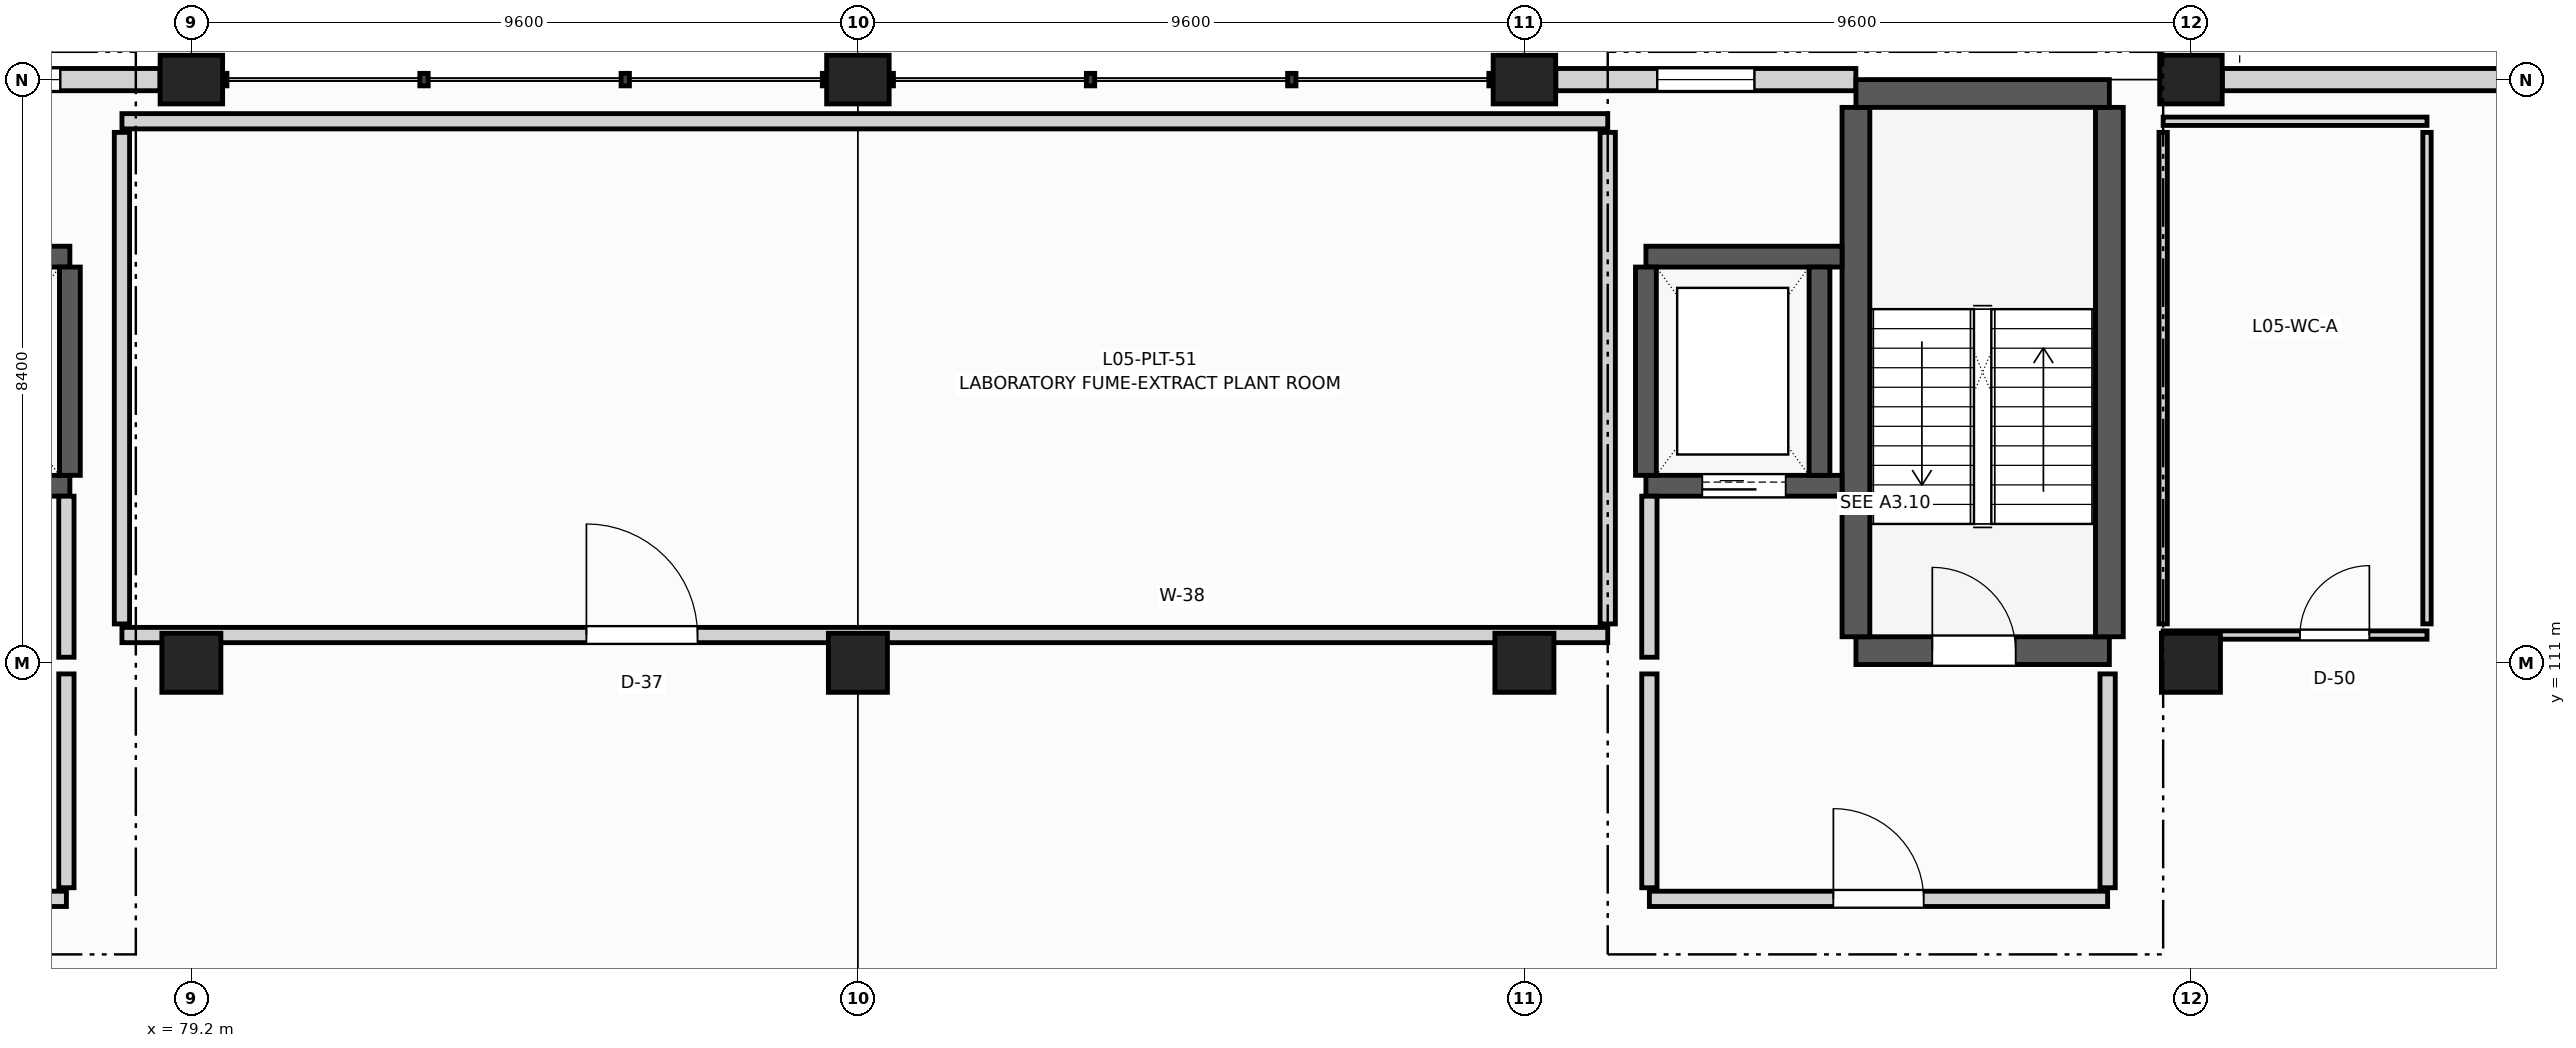
"""IFC4 building model, lengths in metres.
Left out: names, types, materials, properties, quantities, classifications, styles, units other than length and angle.
Written with IfcOpenShell. Run it as: python <this file> out.ifc"""

import sys

from ifc_helpers import new_model, si_unit, direction, frame, frame_2d, origin, origin_2d, place, context, subcontext, project, spatial, rectangle, extrude, element, fill, save


model = new_model("IFC4")
c1 = context("Model", 3, precision=1e-05, world=origin(), true_north=direction((0.0, 1.0)))
c2 = subcontext(c1, "Body", "Model", "MODEL_VIEW")
j1 = project(units=[si_unit("LENGTHUNIT", "METRE"), si_unit("PLANEANGLEUNIT", "RADIAN")], contexts=[c1])
p1 = place(None, origin())
s1 = spatial("IfcSite", under=j1, at=p1, CompositionType="ELEMENT")
p2 = place(p1, origin())
s2 = spatial("IfcBuilding", under=s1, at=p2, CompositionType="ELEMENT")
p3 = place(p2, frame((0.0, 0.0, 22.5)))
s3 = spatial("IfcBuildingStorey", under=s2, at=p3, CompositionType="ELEMENT", Elevation=22.5)
p4 = place(p3, frame((79.2, 111.0, 0.0), z_axis=(0.0, 0.0, 1.0), x_axis=(1.0, 0.0, 0.0)))
e1 = element("IfcColumn", 1, at=p4, inside=s3, PredefinedType="COLUMN", context=c2, shape_type="SweptSolid", body=[
    extrude(rectangle(XDim=0.85, YDim=0.85, at=origin_2d()), origin(), (0.0, 0.0, 1.0), 3.92),
])
p5 = place(p3, frame((79.2, 119.4, 0.0), z_axis=(0.0, 0.0, 1.0), x_axis=(1.0, 0.0, 0.0)))
e2 = element("IfcColumn", 2, at=p5, inside=s3, PredefinedType="COLUMN", context=c2, shape_type="SweptSolid", body=[
    extrude(rectangle(XDim=0.9, YDim=0.7, at=origin_2d()), origin(), (0.0, 0.0, 1.0), 3.92),
])
p6 = place(p3, frame((88.8, 111.0, 0.0), z_axis=(0.0, 0.0, 1.0), x_axis=(1.0, 0.0, 0.0)))
e3 = element("IfcColumn", 3, at=p6, inside=s3, PredefinedType="COLUMN", context=c2, shape_type="SweptSolid", body=[
    extrude(rectangle(XDim=0.85, YDim=0.85, at=origin_2d()), origin(), (0.0, 0.0, 1.0), 3.92),
])
p7 = place(p3, frame((88.8, 119.4, 0.0), z_axis=(0.0, 0.0, 1.0), x_axis=(1.0, 0.0, 0.0)))
e4 = element("IfcColumn", 4, at=p7, inside=s3, PredefinedType="COLUMN", context=c2, shape_type="SweptSolid", body=[
    extrude(rectangle(XDim=0.9, YDim=0.7, at=origin_2d()), origin(), (0.0, 0.0, 1.0), 3.92),
])
p8 = place(p3, frame((98.4, 111.0, 0.0), z_axis=(0.0, 0.0, 1.0), x_axis=(1.0, 0.0, 0.0)))
e5 = element("IfcColumn", 5, at=p8, inside=s3, PredefinedType="COLUMN", context=c2, shape_type="SweptSolid", body=[
    extrude(rectangle(XDim=0.85, YDim=0.85, at=origin_2d()), origin(), (0.0, 0.0, 1.0), 3.92),
])
p9 = place(p3, frame((98.4, 119.4, 0.0), z_axis=(0.0, 0.0, 1.0), x_axis=(1.0, 0.0, 0.0)))
e6 = element("IfcColumn", 6, at=p9, inside=s3, PredefinedType="COLUMN", context=c2, shape_type="SweptSolid", body=[
    extrude(rectangle(XDim=0.9, YDim=0.7, at=origin_2d()), origin(), (0.0, 0.0, 1.0), 3.92),
])
p10 = place(p3, frame((108.0, 111.0, 0.0), z_axis=(0.0, 0.0, 1.0), x_axis=(1.0, 0.0, 0.0)))
e7 = element("IfcColumn", 7, at=p10, inside=s3, PredefinedType="COLUMN", context=c2, shape_type="SweptSolid", body=[
    extrude(rectangle(XDim=0.85, YDim=0.85, at=origin_2d()), origin(), (0.0, 0.0, 1.0), 3.92),
])
p11 = place(p3, frame((108.0, 119.4, 0.0), z_axis=(0.0, 0.0, 1.0), x_axis=(1.0, 0.0, 0.0)))
e8 = element("IfcColumn", 8, at=p11, inside=s3, PredefinedType="COLUMN", context=c2, shape_type="SweptSolid", body=[
    extrude(rectangle(XDim=0.9, YDim=0.7, at=origin_2d()), origin(), (0.0, 0.0, 1.0), 3.92),
])
p12 = place(p3, frame((74.476, 119.4, 0.0), z_axis=(0.0, 0.0, 1.0), x_axis=(1.0, 0.0, 0.0)))
e9 = element("IfcWall", 9, at=p12, inside=s3, PredefinedType="SOLIDWALL", context=c2, shape_type="SweptSolid", body=[
    extrude(rectangle(XDim=4.272, YDim=0.32, at=frame_2d((2.136, 0.0))), origin(), (0.0, 0.0, 1.0), 3.08),
])
p13 = place(p12, frame((1.436, 0.0, 0.9)))
e10 = element("IfcOpeningElement", 10, at=p13, cuts=e9, PredefinedType="OPENING", context=c2, shape_type="SweptSolid", body=[
    extrude(rectangle(XDim=1.4, YDim=1.65, at=frame_2d((0.7, 0.825))), frame((0.0, 0.17, 0.0), z_axis=(0.0, -1.0, 0.0), x_axis=(1.0, 0.0, 0.0)), (0.0, 0.0, 1.0), 0.34),
])
p14 = place(p3, frame((98.852, 119.4, 0.0), z_axis=(0.0, 0.0, 1.0), x_axis=(1.0, 0.0, 0.0)))
e11 = element("IfcWall", 11, at=p14, inside=s3, PredefinedType="SOLIDWALL", context=c2, shape_type="SweptSolid", body=[
    extrude(rectangle(XDim=4.322, YDim=0.32, at=frame_2d((2.161, 0.0))), origin(), (0.0, 0.0, 1.0), 3.08),
])
p15 = place(p14, frame((1.461, 0.0, 0.9)))
e12 = element("IfcOpeningElement", 12, at=p15, cuts=e11, PredefinedType="OPENING", context=c2, shape_type="SweptSolid", body=[
    extrude(rectangle(XDim=1.4, YDim=1.65, at=frame_2d((0.7, 0.825))), frame((0.0, 0.17, 0.0), z_axis=(0.0, -1.0, 0.0), x_axis=(1.0, 0.0, 0.0)), (0.0, 0.0, 1.0), 0.34),
])
p16 = place(p3, frame((108.452, 119.4, 0.0), z_axis=(0.0, 0.0, 1.0), x_axis=(1.0, 0.0, 0.0)))
e13 = element("IfcWall", 13, at=p16, inside=s3, PredefinedType="SOLIDWALL", context=c2, shape_type="SweptSolid", body=[
    extrude(rectangle(XDim=8.696, YDim=0.32, at=frame_2d((4.348, 0.0))), origin(), (0.0, 0.0, 1.0), 3.08),
])
p17 = place(p16, frame((5.448, 0.0, 0.85)))
e14 = element("IfcOpeningElement", 14, at=p17, cuts=e13, PredefinedType="OPENING", context=c2, shape_type="SweptSolid", body=[
    extrude(rectangle(XDim=1.8, YDim=1.9, at=frame_2d((0.9, 0.95))), frame((0.0, 0.17, 0.0), z_axis=(0.0, -1.0, 0.0), x_axis=(1.0, 0.0, 0.0)), (0.0, 0.0, 1.0), 0.34),
])
p18 = place(p3, frame((103.175, 111.175, 0.0), z_axis=(0.0, 0.0, 1.0), x_axis=(1.0, 0.0, 0.0)))
e15 = element("IfcWall", 15, at=p18, inside=s3, PredefinedType="SHEAR", context=c2, shape_type="SweptSolid", body=[
    extrude(rectangle(XDim=3.65, YDim=0.4, at=frame_2d((1.825, 0.0))), origin(), (0.0, 0.0, 1.0), 3.92),
])
p19 = place(p18, frame((1.1, 0.0, 0.0)))
e16 = element("IfcOpeningElement", 16, at=p19, cuts=e15, PredefinedType="OPENING", context=c2, shape_type="SweptSolid", body=[
    extrude(rectangle(XDim=1.2, YDim=2.2, at=frame_2d((0.6, 1.1))), frame((0.0, 0.21, 0.0), z_axis=(0.0, -1.0, 0.0), x_axis=(1.0, 0.0, 0.0)), (0.0, 0.0, 1.0), 0.42),
])
for number, where, z_axis, x_axis in (
    (17, (103.175, 111.375, 0.0), (0.0, 0.0, 1.0), (0.0, 1.0, 0.0)),
    (18, (106.825, 111.375, 0.0), (0.0, 0.0, 1.0), (0.0, 1.0, 0.0)),
):
    element("IfcWall", number, at=place(p3, frame(where, z_axis=z_axis, x_axis=x_axis)), inside=s3, PredefinedType="SHEAR", context=c2, shape_type="SweptSolid", body=[
        extrude(rectangle(XDim=7.625, YDim=0.4, at=frame_2d((3.812, 0.0))), origin(), (0.0, 0.0, 1.0), 3.92),
    ])
p20 = place(p3, frame((103.175, 119.2, 0.0), z_axis=(0.0, 0.0, 1.0), x_axis=(1.0, 0.0, 0.0)))
e19 = element("IfcWall", 19, at=p20, inside=s3, PredefinedType="SHEAR", context=c2, shape_type="SweptSolid", body=[
    extrude(rectangle(XDim=3.65, YDim=0.4, at=frame_2d((1.825, 0.0))), origin(), (0.0, 0.0, 1.0), 3.92),
])
p21 = place(p3, frame((74.7, 113.55, 0.0), z_axis=(0.0, 0.0, 1.0), x_axis=(1.0, 0.0, 0.0)))
e20 = element("IfcWall", 20, at=p21, inside=s3, PredefinedType="SHEAR", context=c2, shape_type="SweptSolid", body=[
    extrude(rectangle(XDim=2.75, YDim=0.3, at=frame_2d((1.375, 0.0))), origin(), (0.0, 0.0, 1.0), 3.92),
])
p22 = place(p21, frame((0.775, 0.0, 0.0)))
e21 = element("IfcOpeningElement", 21, at=p22, cuts=e20, PredefinedType="OPENING", context=c2, shape_type="SweptSolid", body=[
    extrude(rectangle(XDim=1.2, YDim=2.2, at=frame_2d((0.6, 1.1))), frame((0.0, 0.16, 0.0), z_axis=(0.0, -1.0, 0.0), x_axis=(1.0, 0.0, 0.0)), (0.0, 0.0, 1.0), 0.32),
])
p23 = place(p3, frame((74.7, 116.85, 0.0), z_axis=(0.0, 0.0, 1.0), x_axis=(1.0, 0.0, 0.0)))
e22 = element("IfcWall", 22, at=p23, inside=s3, PredefinedType="SHEAR", context=c2, shape_type="SweptSolid", body=[
    extrude(rectangle(XDim=2.75, YDim=0.3, at=frame_2d((1.375, 0.0))), origin(), (0.0, 0.0, 1.0), 3.92),
])
p24 = place(p3, frame((77.45, 113.7, 0.0), z_axis=(0.0, 0.0, 1.0), x_axis=(0.0, 1.0, 0.0)))
e23 = element("IfcWall", 23, at=p24, inside=s3, PredefinedType="SHEAR", context=c2, shape_type="SweptSolid", body=[
    extrude(rectangle(XDim=3.0, YDim=0.3, at=frame_2d((1.5, 0.0))), origin(), (0.0, 0.0, 1.0), 3.92),
])
p25 = place(p3, frame((100.15, 113.55, 0.0), z_axis=(0.0, 0.0, 1.0), x_axis=(1.0, 0.0, 0.0)))
e24 = element("IfcWall", 24, at=p25, inside=s3, PredefinedType="SHEAR", context=c2, shape_type="SweptSolid", body=[
    extrude(rectangle(XDim=2.825, YDim=0.3, at=frame_2d((1.413, 0.0))), origin(), (0.0, 0.0, 1.0), 3.92),
])
p26 = place(p25, frame((0.812, 0.0, 0.0)))
e25 = element("IfcOpeningElement", 25, at=p26, cuts=e24, PredefinedType="OPENING", context=c2, shape_type="SweptSolid", body=[
    extrude(rectangle(XDim=1.2, YDim=2.2, at=frame_2d((0.6, 1.1))), frame((0.0, 0.16, 0.0), z_axis=(0.0, -1.0, 0.0), x_axis=(1.0, 0.0, 0.0)), (0.0, 0.0, 1.0), 0.32),
])
p27 = place(p3, frame((100.15, 116.85, 0.0), z_axis=(0.0, 0.0, 1.0), x_axis=(1.0, 0.0, 0.0)))
e26 = element("IfcWall", 26, at=p27, inside=s3, PredefinedType="SHEAR", context=c2, shape_type="SweptSolid", body=[
    extrude(rectangle(XDim=2.825, YDim=0.3, at=frame_2d((1.413, 0.0))), origin(), (0.0, 0.0, 1.0), 3.92),
])
for number, where, z_axis, x_axis in (
    (27, (100.15, 113.7, 0.0), (0.0, 0.0, 1.0), (0.0, 1.0, 0.0)),
    (28, (102.65, 113.7, 0.0), (0.0, 0.0, 1.0), (0.0, 1.0, 0.0)),
):
    element("IfcWall", number, at=place(p3, frame(where, z_axis=z_axis, x_axis=x_axis)), inside=s3, PredefinedType="SHEAR", context=c2, shape_type="SweptSolid", body=[
        extrude(rectangle(XDim=3.0, YDim=0.3, at=frame_2d((1.5, 0.0))), origin(), (0.0, 0.0, 1.0), 3.92),
    ])
p28 = place(p3, frame((70.8, 107.6, 0.0), z_axis=(0.0, 0.0, 1.0), x_axis=(1.0, 0.0, 0.0)))
e29 = element("IfcWall", 29, at=p28, inside=s3, PredefinedType="PARTITIONING", context=c2, shape_type="SweptSolid", body=[
    extrude(rectangle(XDim=6.6, YDim=0.22, at=frame_2d((3.3, 0.0))), origin(), (0.0, 0.0, 1.0), 3.15),
])
p29 = place(p28, frame((2.65, 0.0, 0.0)))
e30 = element("IfcOpeningElement", 30, at=p29, cuts=e29, PredefinedType="OPENING", context=c2, shape_type="SweptSolid", body=[
    extrude(rectangle(XDim=1.3, YDim=2.2, at=frame_2d((0.65, 1.1))), frame((0.0, 0.12, 0.0), z_axis=(0.0, -1.0, 0.0), x_axis=(1.0, 0.0, 0.0)), (0.0, 0.0, 1.0), 0.24),
])
p30 = place(p3, frame((77.4, 111.08, 0.0), z_axis=(0.0, 0.0, 1.0), x_axis=(0.0, 1.0, 0.0)))
e31 = element("IfcWall", 31, at=p30, inside=s3, PredefinedType="PARTITIONING", context=c2, shape_type="SweptSolid", body=[
    extrude(rectangle(XDim=2.32, YDim=0.22, at=frame_2d((1.16, 0.0))), origin(), (0.0, 0.0, 1.0), 3.15),
])
p31 = place(p3, frame((77.4, 107.76, 0.0), z_axis=(0.0, 0.0, 1.0), x_axis=(0.0, 1.0, 0.0)))
e32 = element("IfcWall", 32, at=p31, inside=s3, PredefinedType="PARTITIONING", context=c2, shape_type="SweptSolid", body=[
    extrude(rectangle(XDim=3.08, YDim=0.22, at=frame_2d((1.54, 0.0))), origin(), (0.0, 0.0, 1.0), 3.15),
])
p32 = place(p3, frame((100.2, 107.6, 0.0), z_axis=(0.0, 0.0, 1.0), x_axis=(1.0, 0.0, 0.0)))
e33 = element("IfcWall", 33, at=p32, inside=s3, PredefinedType="PARTITIONING", context=c2, shape_type="SweptSolid", body=[
    extrude(rectangle(XDim=6.6, YDim=0.22, at=frame_2d((3.3, 0.0))), origin(), (0.0, 0.0, 1.0), 3.15),
])
p33 = place(p32, frame((2.65, 0.0, 0.0)))
e34 = element("IfcOpeningElement", 34, at=p33, cuts=e33, PredefinedType="OPENING", context=c2, shape_type="SweptSolid", body=[
    extrude(rectangle(XDim=1.3, YDim=2.2, at=frame_2d((0.65, 1.1))), frame((0.0, 0.12, 0.0), z_axis=(0.0, -1.0, 0.0), x_axis=(1.0, 0.0, 0.0)), (0.0, 0.0, 1.0), 0.24),
])
p34 = place(p3, frame((100.2, 111.08, 0.0), z_axis=(0.0, 0.0, 1.0), x_axis=(0.0, 1.0, 0.0)))
e35 = element("IfcWall", 35, at=p34, inside=s3, PredefinedType="PARTITIONING", context=c2, shape_type="SweptSolid", body=[
    extrude(rectangle(XDim=2.32, YDim=0.22, at=frame_2d((1.16, 0.0))), origin(), (0.0, 0.0, 1.0), 3.15),
])
for number, where, z_axis, x_axis in (
    (36, (100.2, 107.76, 0.0), (0.0, 0.0, 1.0), (0.0, 1.0, 0.0)),
    (37, (106.8, 107.76, 0.0), (0.0, 0.0, 1.0), (0.0, 1.0, 0.0)),
):
    element("IfcWall", number, at=place(p3, frame(where, z_axis=z_axis, x_axis=x_axis)), inside=s3, PredefinedType="PARTITIONING", context=c2, shape_type="SweptSolid", body=[
        extrude(rectangle(XDim=3.08, YDim=0.22, at=frame_2d((1.54, 0.0))), origin(), (0.0, 0.0, 1.0), 3.15),
    ])
p35 = place(p3, frame((78.2, 111.4, 0.0), z_axis=(0.0, 0.0, 1.0), x_axis=(1.0, 0.0, 0.0)))
e38 = element("IfcWall", 38, at=p35, inside=s3, PredefinedType="PARTITIONING", context=c2, shape_type="SweptSolid", body=[
    extrude(rectangle(XDim=21.4, YDim=0.22, at=frame_2d((10.7, 0.0))), origin(), (0.0, 0.0, 1.0), 3.15),
])
p36 = place(p35, frame((6.69, 0.0, 0.0)))
e39 = element("IfcOpeningElement", 39, at=p36, cuts=e38, PredefinedType="OPENING", context=c2, shape_type="SweptSolid", body=[
    extrude(rectangle(XDim=1.6, YDim=2.3, at=frame_2d((0.8, 1.15))), frame((0.0, 0.12, 0.0), z_axis=(0.0, -1.0, 0.0), x_axis=(1.0, 0.0, 0.0)), (0.0, 0.0, 1.0), 0.24),
])
p37 = place(p3, frame((78.2, 118.8, 0.0), z_axis=(0.0, 0.0, 1.0), x_axis=(1.0, 0.0, 0.0)))
e40 = element("IfcWall", 40, at=p37, inside=s3, PredefinedType="PARTITIONING", context=c2, shape_type="SweptSolid", body=[
    extrude(rectangle(XDim=21.4, YDim=0.22, at=frame_2d((10.7, 0.0))), origin(), (0.0, 0.0, 1.0), 3.15),
])
for number, where, z_axis, x_axis in (
    (41, (78.2, 111.56, 0.0), (0.0, 0.0, 1.0), (0.0, 1.0, 0.0)),
    (42, (99.6, 111.56, 0.0), (0.0, 0.0, 1.0), (0.0, 1.0, 0.0)),
):
    element("IfcWall", number, at=place(p3, frame(where, z_axis=z_axis, x_axis=x_axis)), inside=s3, PredefinedType="PARTITIONING", context=c2, shape_type="SweptSolid", body=[
        extrude(rectangle(XDim=7.08, YDim=0.22, at=frame_2d((3.54, 0.0))), origin(), (0.0, 0.0, 1.0), 3.15),
    ])
p38 = place(p3, frame((107.6, 111.4, 0.0), z_axis=(0.0, 0.0, 1.0), x_axis=(1.0, 0.0, 0.0)))
e43 = element("IfcWall", 43, at=p38, inside=s3, PredefinedType="PARTITIONING", context=c2, shape_type="SweptSolid", body=[
    extrude(rectangle(XDim=3.8, YDim=0.12, at=frame_2d((1.9, 0.0))), origin(), (0.0, 0.0, 1.0), 3.15),
])
p39 = place(p38, frame((1.97, 0.0, 0.0)))
e44 = element("IfcOpeningElement", 44, at=p39, cuts=e43, PredefinedType="OPENING", context=c2, shape_type="SweptSolid", body=[
    extrude(rectangle(XDim=1.0, YDim=2.15, at=frame_2d((0.5, 1.075))), frame((0.0, 0.07, 0.0), z_axis=(0.0, -1.0, 0.0), x_axis=(1.0, 0.0, 0.0)), (0.0, 0.0, 1.0), 0.14),
])
p40 = place(p3, frame((107.6, 118.8, 0.0), z_axis=(0.0, 0.0, 1.0), x_axis=(1.0, 0.0, 0.0)))
e45 = element("IfcWall", 45, at=p40, inside=s3, PredefinedType="PARTITIONING", context=c2, shape_type="SweptSolid", body=[
    extrude(rectangle(XDim=3.8, YDim=0.12, at=frame_2d((1.9, 0.0))), origin(), (0.0, 0.0, 1.0), 3.15),
])
for number, where, z_axis, x_axis in (
    (46, (107.6, 111.56, 0.0), (0.0, 0.0, 1.0), (0.0, 1.0, 0.0)),
    (47, (111.4, 111.56, 0.0), (0.0, 0.0, 1.0), (0.0, 1.0, 0.0)),
):
    element("IfcWall", number, at=place(p3, frame(where, z_axis=z_axis, x_axis=x_axis)), inside=s3, PredefinedType="PARTITIONING", context=c2, shape_type="SweptSolid", body=[
        extrude(rectangle(XDim=7.08, YDim=0.12, at=frame_2d((3.54, 0.0))), origin(), (0.0, 0.0, 1.0), 3.15),
    ])
p41 = place(p13, origin())
e48 = element("IfcWindow", 48, at=p41, inside=s3, PartitioningType="SINGLE_PANEL", PredefinedType="WINDOW", context=c2, shape_type="SweptSolid", body=[
    extrude(rectangle(XDim=1.4, YDim=1.65, at=frame_2d((0.7, 0.825))), frame((0.0, 0.03, 0.0), z_axis=(0.0, -1.0, 0.0), x_axis=(1.0, 0.0, 0.0)), (0.0, 0.0, 1.0), 0.06),
])
fill(e10, e48)
p42 = place(p15, origin())
e49 = element("IfcWindow", 49, at=p42, inside=s3, PartitioningType="SINGLE_PANEL", PredefinedType="WINDOW", context=c2, shape_type="SweptSolid", body=[
    extrude(rectangle(XDim=1.4, YDim=1.65, at=frame_2d((0.7, 0.825))), frame((0.0, 0.03, 0.0), z_axis=(0.0, -1.0, 0.0), x_axis=(1.0, 0.0, 0.0)), (0.0, 0.0, 1.0), 0.06),
])
fill(e12, e49)
p43 = place(p19, origin())
e50 = element("IfcDoor", 50, at=p43, inside=s3, OperationType="SINGLE_SWING_LEFT", PredefinedType="DOOR", context=c2, shape_type="SweptSolid", body=[
    extrude(rectangle(XDim=1.2, YDim=2.2, at=frame_2d((0.6, 1.1))), frame((0.0, 0.025, 0.0), z_axis=(0.0, -1.0, 0.0), x_axis=(1.0, 0.0, 0.0)), (0.0, 0.0, 1.0), 0.05),
])
fill(e16, e50)
p44 = place(p26, origin())
e51 = element("IfcDoor", 51, at=p44, inside=s3, OperationType="SLIDING_TO_LEFT", PredefinedType="DOOR", context=c2, shape_type="SweptSolid", body=[
    extrude(rectangle(XDim=1.2, YDim=2.2, at=frame_2d((0.6, 1.1))), frame((0.0, 0.025, 0.0), z_axis=(0.0, -1.0, 0.0), x_axis=(1.0, 0.0, 0.0)), (0.0, 0.0, 1.0), 0.05),
])
fill(e25, e51)
p45 = place(p33, origin())
e52 = element("IfcDoor", 52, at=p45, inside=s3, OperationType="SINGLE_SWING_LEFT", PredefinedType="DOOR", context=c2, shape_type="SweptSolid", body=[
    extrude(rectangle(XDim=1.3, YDim=2.2, at=frame_2d((0.65, 1.1))), frame((0.0, 0.025, 0.0), z_axis=(0.0, -1.0, 0.0), x_axis=(1.0, 0.0, 0.0)), (0.0, 0.0, 1.0), 0.05),
])
fill(e34, e52)
p46 = place(p36, origin())
e53 = element("IfcDoor", 53, at=p46, inside=s3, OperationType="SINGLE_SWING_LEFT", PredefinedType="DOOR", context=c2, shape_type="SweptSolid", body=[
    extrude(rectangle(XDim=1.6, YDim=2.3, at=frame_2d((0.8, 1.15))), frame((0.0, 0.025, 0.0), z_axis=(0.0, -1.0, 0.0), x_axis=(1.0, 0.0, 0.0)), (0.0, 0.0, 1.0), 0.05),
])
fill(e39, e53)
p47 = place(p39, origin())
e54 = element("IfcDoor", 54, at=p47, inside=s3, OperationType="SINGLE_SWING_RIGHT", PredefinedType="DOOR", context=c2, shape_type="SweptSolid", body=[
    extrude(rectangle(XDim=1.0, YDim=2.15, at=frame_2d((0.5, 1.075))), frame((0.0, 0.025, 0.0), z_axis=(0.0, -1.0, 0.0), x_axis=(1.0, 0.0, 0.0)), (0.0, 0.0, 1.0), 0.05),
])
fill(e44, e54)
save(model, sys.argv[1])
